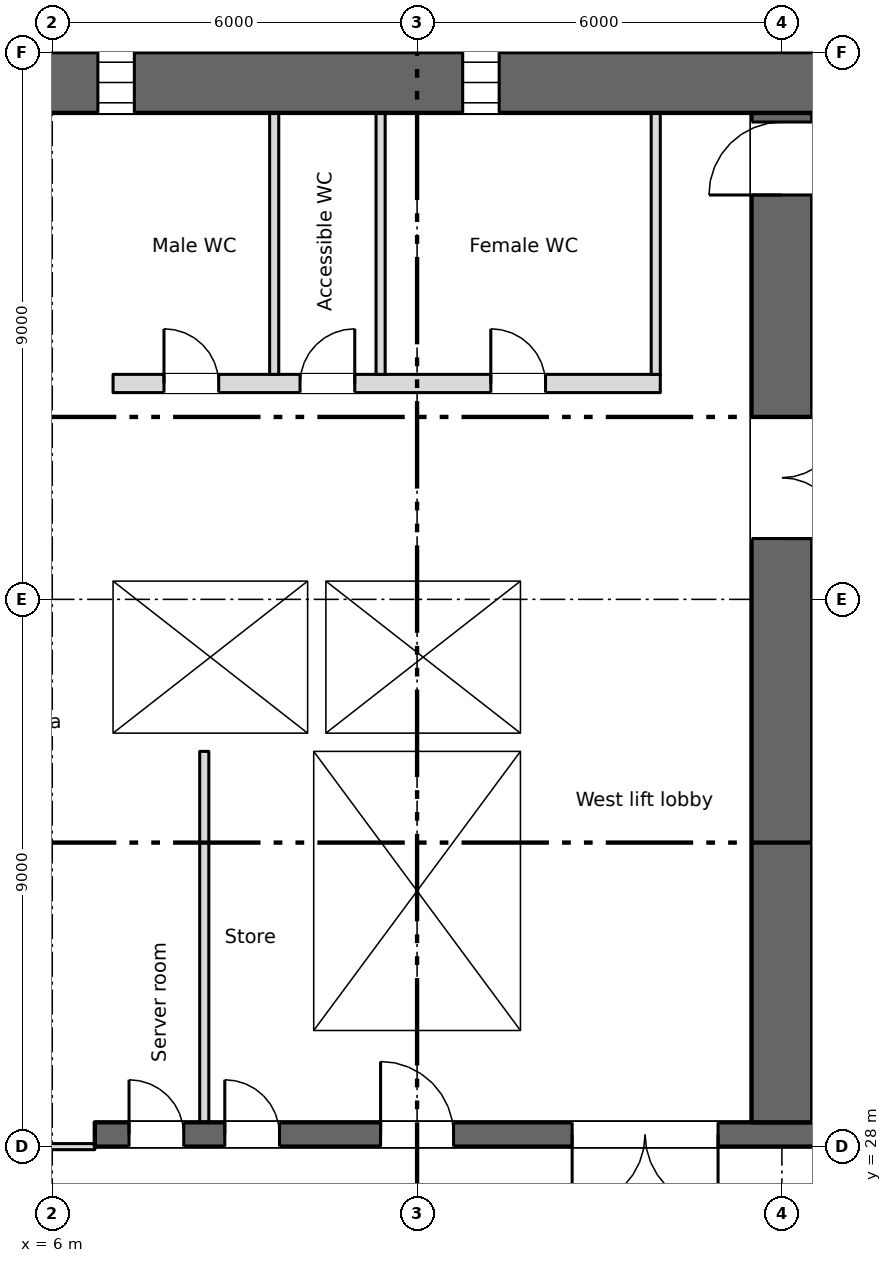
"""IFC4 building model, lengths in metres.
Left out: names, types, materials, properties, quantities, classifications, styles, units other than length and angle.
Written with IfcOpenShell. Run it as: python <this file> out.ifc"""

import sys

from ifc_helpers import new_model, si_unit, direction, frame, frame_2d, origin, place, context, subcontext, project, spatial, rectangle, extrude, element, fill, save


model = new_model("IFC4")
c1 = context("Model", 3, precision=1e-05, world=origin(), true_north=direction((0.0, 1.0)))
c2 = subcontext(c1, "Body", "Model", "MODEL_VIEW")
j1 = project(units=[si_unit("LENGTHUNIT", "METRE"), si_unit("PLANEANGLEUNIT", "RADIAN")], contexts=[c1])
p1 = place(None, origin())
s1 = spatial("IfcSite", under=j1, at=p1, CompositionType="ELEMENT")
p2 = place(p1, origin())
s2 = spatial("IfcBuilding", under=s1, at=p2, CompositionType="ELEMENT")
p3 = place(p2, frame((0.0, 0.0, 41.25)))
s3 = spatial("IfcBuildingStorey", under=s2, at=p3, CompositionType="ELEMENT", Elevation=41.25)
p4 = place(p3, frame((5.55, 45.5, 0.0), z_axis=(0.0, 0.0, 1.0), x_axis=(1.0, 0.0, 0.0)))
e1 = element("IfcWall", 1, at=p4, inside=s3, PredefinedType="SHEAR", context=c2, shape_type="SweptSolid", body=[
    extrude(rectangle(XDim=66.9, YDim=1.0, at=frame_2d((33.45, 0.0))), origin(), (0.0, 0.0, 1.0), 3.35),
])
p5 = place(p4, frame((1.2, 0.0, 0.6)))
e2 = element("IfcOpeningElement", 2, at=p5, cuts=e1, PredefinedType="OPENING", context=c2, shape_type="SweptSolid", body=[
    extrude(rectangle(XDim=0.6, YDim=2.4, at=frame_2d((0.3, 1.2))), frame((0.0, 0.51, 0.0), z_axis=(0.0, -1.0, 0.0), x_axis=(1.0, 0.0, 0.0)), (0.0, 0.0, 1.0), 1.02),
])
p6 = place(p4, frame((7.2, 0.0, 0.6)))
e3 = element("IfcOpeningElement", 3, at=p6, cuts=e1, PredefinedType="OPENING", context=c2, shape_type="SweptSolid", body=[
    extrude(rectangle(XDim=0.6, YDim=2.4, at=frame_2d((0.3, 1.2))), frame((0.0, 0.51, 0.0), z_axis=(0.0, -1.0, 0.0), x_axis=(1.0, 0.0, 0.0)), (0.0, 0.0, 1.0), 1.02),
])
p7 = place(p4, frame((55.2, 0.0, 0.6)))
e4 = element("IfcOpeningElement", 4, at=p7, cuts=e1, PredefinedType="OPENING", context=c2, shape_type="SweptSolid", body=[
    extrude(rectangle(XDim=0.6, YDim=2.4, at=frame_2d((0.3, 1.2))), frame((0.0, 0.51, 0.0), z_axis=(0.0, -1.0, 0.0), x_axis=(1.0, 0.0, 0.0)), (0.0, 0.0, 1.0), 1.02),
])
p8 = place(p4, frame((61.2, 0.0, 0.6)))
e5 = element("IfcOpeningElement", 5, at=p8, cuts=e1, PredefinedType="OPENING", context=c2, shape_type="SweptSolid", body=[
    extrude(rectangle(XDim=0.6, YDim=2.4, at=frame_2d((0.3, 1.2))), frame((0.0, 0.51, 0.0), z_axis=(0.0, -1.0, 0.0), x_axis=(1.0, 0.0, 0.0)), (0.0, 0.0, 1.0), 1.02),
])
p9 = place(p3, frame((6.7, 28.2, 0.0), z_axis=(0.0, 0.0, 1.0), x_axis=(1.0, 0.0, 0.0)))
e6 = element("IfcWall", 6, at=p9, inside=s3, PredefinedType="SHEAR", context=c2, shape_type="SweptSolid", body=[
    extrude(rectangle(XDim=57.8, YDim=0.4, at=frame_2d((28.9, 0.0))), origin(), (0.0, 0.0, 1.0), 3.35),
])
p10 = place(p9, frame((12.812, 0.0, 0.0)))
e7 = element("IfcOpeningElement", 7, at=p10, cuts=e6, PredefinedType="OPENING", context=c2, shape_type="SweptSolid", body=[
    extrude(rectangle(XDim=0.9, YDim=2.1, at=frame_2d((0.45, 1.05))), frame((0.0, 0.21, 0.0), z_axis=(0.0, -1.0, 0.0), x_axis=(1.0, 0.0, 0.0)), (0.0, 0.0, 1.0), 0.42),
])
p11 = place(p9, frame((15.387, 0.0, 0.0)))
e8 = element("IfcOpeningElement", 8, at=p11, cuts=e6, PredefinedType="OPENING", context=c2, shape_type="SweptSolid", body=[
    extrude(rectangle(XDim=0.9, YDim=2.1, at=frame_2d((0.45, 1.05))), frame((0.0, 0.21, 0.0), z_axis=(0.0, -1.0, 0.0), x_axis=(1.0, 0.0, 0.0)), (0.0, 0.0, 1.0), 0.42),
])
p12 = place(p9, frame((48.312, 0.0, 0.0)))
e9 = element("IfcOpeningElement", 9, at=p12, cuts=e6, PredefinedType="OPENING", context=c2, shape_type="SweptSolid", body=[
    extrude(rectangle(XDim=0.9, YDim=2.1, at=frame_2d((0.45, 1.05))), frame((0.0, 0.21, 0.0), z_axis=(0.0, -1.0, 0.0), x_axis=(1.0, 0.0, 0.0)), (0.0, 0.0, 1.0), 0.42),
])
p13 = place(p9, frame((50.887, 0.0, 0.0)))
e10 = element("IfcOpeningElement", 10, at=p13, cuts=e6, PredefinedType="OPENING", context=c2, shape_type="SweptSolid", body=[
    extrude(rectangle(XDim=0.9, YDim=2.1, at=frame_2d((0.45, 1.05))), frame((0.0, 0.21, 0.0), z_axis=(0.0, -1.0, 0.0), x_axis=(1.0, 0.0, 0.0)), (0.0, 0.0, 1.0), 0.42),
])
p14 = place(p9, frame((0.562, 0.0, 0.0)))
e11 = element("IfcOpeningElement", 11, at=p14, cuts=e6, PredefinedType="OPENING", context=c2, shape_type="SweptSolid", body=[
    extrude(rectangle(XDim=0.9, YDim=2.1, at=frame_2d((0.45, 1.05))), frame((0.0, 0.21, 0.0), z_axis=(0.0, -1.0, 0.0), x_axis=(1.0, 0.0, 0.0)), (0.0, 0.0, 1.0), 0.42),
])
p15 = place(p9, frame((2.137, 0.0, 0.0)))
e12 = element("IfcOpeningElement", 12, at=p15, cuts=e6, PredefinedType="OPENING", context=c2, shape_type="SweptSolid", body=[
    extrude(rectangle(XDim=0.9, YDim=2.1, at=frame_2d((0.45, 1.05))), frame((0.0, 0.21, 0.0), z_axis=(0.0, -1.0, 0.0), x_axis=(1.0, 0.0, 0.0)), (0.0, 0.0, 1.0), 0.42),
])
p16 = place(p9, frame((4.7, 0.0, 0.0)))
e13 = element("IfcOpeningElement", 13, at=p16, cuts=e6, PredefinedType="OPENING", context=c2, shape_type="SweptSolid", body=[
    extrude(rectangle(XDim=1.2, YDim=2.1, at=frame_2d((0.6, 1.05))), frame((0.0, 0.21, 0.0), z_axis=(0.0, -1.0, 0.0), x_axis=(1.0, 0.0, 0.0)), (0.0, 0.0, 1.0), 0.42),
])
p17 = place(p9, frame((31.7, 0.0, 0.0)))
e14 = element("IfcOpeningElement", 14, at=p17, cuts=e6, PredefinedType="OPENING", context=c2, shape_type="SweptSolid", body=[
    extrude(rectangle(XDim=1.2, YDim=2.1, at=frame_2d((0.6, 1.05))), frame((0.0, 0.21, 0.0), z_axis=(0.0, -1.0, 0.0), x_axis=(1.0, 0.0, 0.0)), (0.0, 0.0, 1.0), 0.42),
])
p18 = place(p9, frame((55.2, 0.0, 0.0)))
e15 = element("IfcOpeningElement", 15, at=p18, cuts=e6, PredefinedType="OPENING", context=c2, shape_type="SweptSolid", body=[
    extrude(rectangle(XDim=1.2, YDim=2.1, at=frame_2d((0.6, 1.05))), frame((0.0, 0.21, 0.0), z_axis=(0.0, -1.0, 0.0), x_axis=(1.0, 0.0, 0.0)), (0.0, 0.0, 1.0), 0.42),
])
p19 = place(p9, frame((21.7, 0.0, 0.0)))
e16 = element("IfcOpeningElement", 16, at=p19, cuts=e6, PredefinedType="OPENING", context=c2, shape_type="SweptSolid", body=[
    extrude(rectangle(XDim=1.2, YDim=2.1, at=frame_2d((0.6, 1.05))), frame((0.0, 0.21, 0.0), z_axis=(0.0, -1.0, 0.0), x_axis=(1.0, 0.0, 0.0)), (0.0, 0.0, 1.0), 0.42),
])
p20 = place(p9, frame((41.7, 0.0, 0.0)))
e17 = element("IfcOpeningElement", 17, at=p20, cuts=e6, PredefinedType="OPENING", context=c2, shape_type="SweptSolid", body=[
    extrude(rectangle(XDim=1.2, YDim=2.1, at=frame_2d((0.6, 1.05))), frame((0.0, 0.21, 0.0), z_axis=(0.0, -1.0, 0.0), x_axis=(1.0, 0.0, 0.0)), (0.0, 0.0, 1.0), 0.42),
])
p21 = place(p9, frame((24.85, 0.0, 0.0)))
e18 = element("IfcOpeningElement", 18, at=p21, cuts=e6, PredefinedType="OPENING", context=c2, shape_type="SweptSolid", body=[
    extrude(rectangle(XDim=2.4, YDim=2.1, at=frame_2d((1.2, 1.05))), frame((0.0, 0.21, 0.0), z_axis=(0.0, -1.0, 0.0), x_axis=(1.0, 0.0, 0.0)), (0.0, 0.0, 1.0), 0.42),
])
p22 = place(p9, frame((37.35, 0.0, 0.0)))
e19 = element("IfcOpeningElement", 19, at=p22, cuts=e6, PredefinedType="OPENING", context=c2, shape_type="SweptSolid", body=[
    extrude(rectangle(XDim=2.4, YDim=2.1, at=frame_2d((1.2, 1.05))), frame((0.0, 0.21, 0.0), z_axis=(0.0, -1.0, 0.0), x_axis=(1.0, 0.0, 0.0)), (0.0, 0.0, 1.0), 0.42),
])
p23 = place(p9, frame((7.85, 0.0, 0.0)))
e20 = element("IfcOpeningElement", 20, at=p23, cuts=e6, PredefinedType="OPENING", context=c2, shape_type="SweptSolid", body=[
    extrude(rectangle(XDim=2.4, YDim=2.1, at=frame_2d((1.2, 1.05))), frame((0.0, 0.21, 0.0), z_axis=(0.0, -1.0, 0.0), x_axis=(1.0, 0.0, 0.0)), (0.0, 0.0, 1.0), 0.42),
])
p24 = place(p9, frame((28.85, 0.0, 0.0)))
e21 = element("IfcOpeningElement", 21, at=p24, cuts=e6, PredefinedType="OPENING", context=c2, shape_type="SweptSolid", body=[
    extrude(rectangle(XDim=0.9, YDim=2.1, at=frame_2d((0.45, 1.05))), frame((0.0, 0.21, 0.0), z_axis=(0.0, -1.0, 0.0), x_axis=(1.0, 0.0, 0.0)), (0.0, 0.0, 1.0), 0.42),
])
p25 = place(p9, frame((34.85, 0.0, 0.0)))
e22 = element("IfcOpeningElement", 22, at=p25, cuts=e6, PredefinedType="OPENING", context=c2, shape_type="SweptSolid", body=[
    extrude(rectangle(XDim=0.9, YDim=2.1, at=frame_2d((0.45, 1.05))), frame((0.0, 0.21, 0.0), z_axis=(0.0, -1.0, 0.0), x_axis=(1.0, 0.0, 0.0)), (0.0, 0.0, 1.0), 0.42),
])
p26 = place(p3, frame((6.85, 28.4, 0.0), z_axis=(0.0, 0.0, 1.0), x_axis=(0.0, 1.0, 0.0)))
e23 = element("IfcWall", 23, at=p26, inside=s3, PredefinedType="SHEAR", context=c2, shape_type="SweptSolid", body=[
    extrude(rectangle(XDim=16.6, YDim=0.3, at=frame_2d((8.3, 0.0))), origin(), (0.0, 0.0, 1.0), 3.35),
])
p27 = place(p3, frame((18.0, 28.4, 0.0), z_axis=(0.0, 0.0, 1.0), x_axis=(0.0, 1.0, 0.0)))
e24 = element("IfcWall", 24, at=p27, inside=s3, PredefinedType="SHEAR", context=c2, shape_type="SweptSolid", body=[
    extrude(rectangle(XDim=16.6, YDim=1.0, at=frame_2d((8.3, 0.0))), origin(), (0.0, 0.0, 1.0), 3.35),
])
p28 = place(p27, frame((9.6, 0.0, 0.0)))
e25 = element("IfcOpeningElement", 25, at=p28, cuts=e24, PredefinedType="OPENING", context=c2, shape_type="SweptSolid", body=[
    extrude(rectangle(XDim=2.0, YDim=2.1, at=frame_2d((1.0, 1.05))), frame((0.0, 0.51, 0.0), z_axis=(0.0, -1.0, 0.0), x_axis=(1.0, 0.0, 0.0)), (0.0, 0.0, 1.0), 1.02),
])
p29 = place(p27, frame((15.25, 0.0, 0.0)))
e26 = element("IfcOpeningElement", 26, at=p29, cuts=e24, PredefinedType="OPENING", context=c2, shape_type="SweptSolid", body=[
    extrude(rectangle(XDim=1.2, YDim=2.1, at=frame_2d((0.6, 1.05))), frame((0.0, 0.51, 0.0), z_axis=(0.0, -1.0, 0.0), x_axis=(1.0, 0.0, 0.0)), (0.0, 0.0, 1.0), 1.02),
])
for number, where, z_axis, x_axis in (
    (27, (10.15, 28.4, 0.0), (0.0, 0.0, 1.0), (0.0, 1.0, 0.0)),
    (28, (13.85, 28.4, 0.0), (0.0, 0.0, 1.0), (0.0, 1.0, 0.0)),
):
    element("IfcWall", number, at=place(p3, frame(where, z_axis=z_axis, x_axis=x_axis)), inside=s3, PredefinedType="SHEAR", context=c2, shape_type="SweptSolid", body=[
        extrude(rectangle(XDim=6.1, YDim=0.3, at=frame_2d((3.05, 0.0))), origin(), (0.0, 0.0, 1.0), 3.35),
    ])
for number, where, z_axis, x_axis in (
    (29, (7.0, 34.65, 0.0), (0.0, 0.0, 1.0), (1.0, 0.0, 0.0)),
    (30, (7.0, 37.45, 0.0), (0.0, 0.0, 1.0), (1.0, 0.0, 0.0)),
):
    element("IfcWall", number, at=place(p3, frame(where, z_axis=z_axis, x_axis=x_axis)), inside=s3, PredefinedType="SHEAR", context=c2, shape_type="SweptSolid", body=[
        extrude(rectangle(XDim=7.0, YDim=0.3, at=frame_2d((3.5, 0.0))), origin(), (0.0, 0.0, 1.0), 3.35),
    ])
p30 = place(p3, frame((13.85, 34.8, 0.0), z_axis=(0.0, 0.0, 1.0), x_axis=(0.0, 1.0, 0.0)))
e31 = element("IfcWall", 31, at=p30, inside=s3, PredefinedType="SHEAR", context=c2, shape_type="SweptSolid", body=[
    extrude(rectangle(XDim=2.5, YDim=0.3, at=frame_2d((1.25, 0.0))), origin(), (0.0, 0.0, 1.0), 3.35),
])
p31 = place(p3, frame((7.0, 40.55, 0.0), z_axis=(0.0, 0.0, 1.0), x_axis=(1.0, 0.0, 0.0)))
e32 = element("IfcWall", 32, at=p31, inside=s3, PredefinedType="PARTITIONING", context=c2, shape_type="SweptSolid", body=[
    extrude(rectangle(XDim=9.0, YDim=0.3, at=frame_2d((4.5, 0.0))), origin(), (0.0, 0.0, 1.0), 3.35),
])
p32 = place(p31, frame((0.837, 0.0, 0.0)))
e33 = element("IfcOpeningElement", 33, at=p32, cuts=e32, PredefinedType="OPENING", context=c2, shape_type="SweptSolid", body=[
    extrude(rectangle(XDim=0.9, YDim=2.1, at=frame_2d((0.45, 1.05))), frame((0.0, 0.16, 0.0), z_axis=(0.0, -1.0, 0.0), x_axis=(1.0, 0.0, 0.0)), (0.0, 0.0, 1.0), 0.32),
])
p33 = place(p31, frame((3.075, 0.0, 0.0)))
e34 = element("IfcOpeningElement", 34, at=p33, cuts=e32, PredefinedType="OPENING", context=c2, shape_type="SweptSolid", body=[
    extrude(rectangle(XDim=0.9, YDim=2.1, at=frame_2d((0.45, 1.05))), frame((0.0, 0.16, 0.0), z_axis=(0.0, -1.0, 0.0), x_axis=(1.0, 0.0, 0.0)), (0.0, 0.0, 1.0), 0.32),
])
p34 = place(p31, frame((6.212, 0.0, 0.0)))
e35 = element("IfcOpeningElement", 35, at=p34, cuts=e32, PredefinedType="OPENING", context=c2, shape_type="SweptSolid", body=[
    extrude(rectangle(XDim=0.9, YDim=2.1, at=frame_2d((0.45, 1.05))), frame((0.0, 0.16, 0.0), z_axis=(0.0, -1.0, 0.0), x_axis=(1.0, 0.0, 0.0)), (0.0, 0.0, 1.0), 0.32),
])
p35 = place(p3, frame((10.35, 34.8, 0.0), z_axis=(0.0, 0.0, 1.0), x_axis=(0.0, 1.0, 0.0)))
e36 = element("IfcWall", 36, at=p35, inside=s3, PredefinedType="SHEAR", context=c2, shape_type="SweptSolid", body=[
    extrude(rectangle(XDim=2.5, YDim=0.3, at=frame_2d((1.25, 0.0))), origin(), (0.0, 0.0, 1.0), 3.35),
])
p36 = place(p3, frame((15.925, 40.7, 0.0), z_axis=(0.0, 0.0, 1.0), x_axis=(0.0, 1.0, 0.0)))
e37 = element("IfcWall", 37, at=p36, inside=s3, PredefinedType="PARTITIONING", context=c2, shape_type="SweptSolid", body=[
    extrude(rectangle(XDim=4.3, YDim=0.15, at=frame_2d((2.15, 0.0))), origin(), (0.0, 0.0, 1.0), 3.35),
])
p37 = place(p3, frame((8.5, 28.4, 0.0), z_axis=(0.0, 0.0, 1.0), x_axis=(0.0, 1.0, 0.0)))
e38 = element("IfcWall", 38, at=p37, inside=s3, PredefinedType="PARTITIONING", context=c2, shape_type="SweptSolid", body=[
    extrude(rectangle(XDim=6.1, YDim=0.15, at=frame_2d((3.05, 0.0))), origin(), (0.0, 0.0, 1.0), 3.35),
])
for number, where, z_axis, x_axis in (
    (39, (9.65, 40.7, 0.0), (0.0, 0.0, 1.0), (0.0, 1.0, 0.0)),
    (40, (11.4, 40.7, 0.0), (0.0, 0.0, 1.0), (0.0, 1.0, 0.0)),
):
    element("IfcWall", number, at=place(p3, frame(where, z_axis=z_axis, x_axis=x_axis)), inside=s3, PredefinedType="PARTITIONING", context=c2, shape_type="SweptSolid", body=[
        extrude(rectangle(XDim=4.3, YDim=0.15, at=frame_2d((2.15, 0.0))), origin(), (0.0, 0.0, 1.0), 3.35),
    ])
p38 = place(p3, frame((0.8, 28.0, 0.0), z_axis=(0.0, 0.0, 1.0), x_axis=(1.0, 0.0, 0.0)))
e41 = element("IfcWall", 41, at=p38, inside=s3, PredefinedType="PARTITIONING", context=c2, shape_type="SweptSolid", body=[
    extrude(rectangle(XDim=5.9, YDim=0.1, at=frame_2d((2.95, 0.0))), origin(), (0.0, 0.0, 1.0), 3.35),
])
p39 = place(p38, frame((2.05, 0.0, 0.0)))
e42 = element("IfcOpeningElement", 42, at=p39, cuts=e41, PredefinedType="OPENING", context=c2, shape_type="SweptSolid", body=[
    extrude(rectangle(XDim=1.8, YDim=2.1, at=frame_2d((0.9, 1.05))), frame((0.0, 0.06, 0.0), z_axis=(0.0, -1.0, 0.0), x_axis=(1.0, 0.0, 0.0)), (0.0, 0.0, 1.0), 0.12),
])
p40 = place(p5, origin())
e43 = element("IfcWindow", 43, at=p40, inside=s3, PartitioningType="SINGLE_PANEL", PredefinedType="WINDOW", context=c2, shape_type="SweptSolid", body=[
    extrude(rectangle(XDim=0.6, YDim=2.4, at=frame_2d((0.3, 1.2))), frame((0.0, 0.03, 0.0), z_axis=(0.0, -1.0, 0.0), x_axis=(1.0, 0.0, 0.0)), (0.0, 0.0, 1.0), 0.06),
])
fill(e2, e43)
p41 = place(p6, origin())
e44 = element("IfcWindow", 44, at=p41, inside=s3, PartitioningType="SINGLE_PANEL", PredefinedType="WINDOW", context=c2, shape_type="SweptSolid", body=[
    extrude(rectangle(XDim=0.6, YDim=2.4, at=frame_2d((0.3, 1.2))), frame((0.0, 0.03, 0.0), z_axis=(0.0, -1.0, 0.0), x_axis=(1.0, 0.0, 0.0)), (0.0, 0.0, 1.0), 0.06),
])
fill(e3, e44)
p42 = place(p14, origin())
e45 = element("IfcDoor", 45, at=p42, inside=s3, OperationType="SINGLE_SWING_LEFT", PredefinedType="DOOR", context=c2, shape_type="SweptSolid", body=[
    extrude(rectangle(XDim=0.9, YDim=2.1, at=frame_2d((0.45, 1.05))), frame((0.0, 0.025, 0.0), z_axis=(0.0, -1.0, 0.0), x_axis=(1.0, 0.0, 0.0)), (0.0, 0.0, 1.0), 0.05),
])
fill(e11, e45)
p43 = place(p15, origin())
e46 = element("IfcDoor", 46, at=p43, inside=s3, OperationType="SINGLE_SWING_LEFT", PredefinedType="DOOR", context=c2, shape_type="SweptSolid", body=[
    extrude(rectangle(XDim=0.9, YDim=2.1, at=frame_2d((0.45, 1.05))), frame((0.0, 0.025, 0.0), z_axis=(0.0, -1.0, 0.0), x_axis=(1.0, 0.0, 0.0)), (0.0, 0.0, 1.0), 0.05),
])
fill(e12, e46)
p44 = place(p32, origin())
e47 = element("IfcDoor", 47, at=p44, inside=s3, OperationType="SINGLE_SWING_LEFT", PredefinedType="DOOR", context=c2, shape_type="SweptSolid", body=[
    extrude(rectangle(XDim=0.9, YDim=2.1, at=frame_2d((0.45, 1.05))), frame((0.0, 0.025, 0.0), z_axis=(0.0, -1.0, 0.0), x_axis=(1.0, 0.0, 0.0)), (0.0, 0.0, 1.0), 0.05),
])
fill(e33, e47)
p45 = place(p33, origin())
e48 = element("IfcDoor", 48, at=p45, inside=s3, OperationType="SINGLE_SWING_RIGHT", PredefinedType="DOOR", context=c2, shape_type="SweptSolid", body=[
    extrude(rectangle(XDim=0.9, YDim=2.1, at=frame_2d((0.45, 1.05))), frame((0.0, 0.025, 0.0), z_axis=(0.0, -1.0, 0.0), x_axis=(1.0, 0.0, 0.0)), (0.0, 0.0, 1.0), 0.05),
])
fill(e34, e48)
p46 = place(p34, origin())
e49 = element("IfcDoor", 49, at=p46, inside=s3, OperationType="SINGLE_SWING_LEFT", PredefinedType="DOOR", context=c2, shape_type="SweptSolid", body=[
    extrude(rectangle(XDim=0.9, YDim=2.1, at=frame_2d((0.45, 1.05))), frame((0.0, 0.025, 0.0), z_axis=(0.0, -1.0, 0.0), x_axis=(1.0, 0.0, 0.0)), (0.0, 0.0, 1.0), 0.05),
])
fill(e35, e49)
p47 = place(p16, origin())
e50 = element("IfcDoor", 50, at=p47, inside=s3, OperationType="SINGLE_SWING_LEFT", PredefinedType="DOOR", context=c2, shape_type="SweptSolid", body=[
    extrude(rectangle(XDim=1.2, YDim=2.1, at=frame_2d((0.6, 1.05))), frame((0.0, 0.025, 0.0), z_axis=(0.0, -1.0, 0.0), x_axis=(1.0, 0.0, 0.0)), (0.0, 0.0, 1.0), 0.05),
])
fill(e13, e50)
p48 = place(p23, origin())
e51 = element("IfcDoor", 51, at=p48, inside=s3, OperationType="DOUBLE_DOOR_SINGLE_SWING", PredefinedType="DOOR", context=c2, shape_type="SweptSolid", body=[
    extrude(rectangle(XDim=2.4, YDim=2.1, at=frame_2d((1.2, 1.05))), frame((0.0, 0.025, 0.0), z_axis=(0.0, -1.0, 0.0), x_axis=(1.0, 0.0, 0.0)), (0.0, 0.0, 1.0), 0.05),
])
fill(e20, e51)
p49 = place(p28, origin())
e52 = element("IfcDoor", 52, at=p49, inside=s3, OperationType="DOUBLE_DOOR_SINGLE_SWING", PredefinedType="DOOR", context=c2, shape_type="SweptSolid", body=[
    extrude(rectangle(XDim=2.0, YDim=2.1, at=frame_2d((1.0, 1.05))), frame((0.0, 0.025, 0.0), z_axis=(0.0, -1.0, 0.0), x_axis=(1.0, 0.0, 0.0)), (0.0, 0.0, 1.0), 0.05),
])
fill(e25, e52)
p50 = place(p29, origin())
e53 = element("IfcDoor", 53, at=p50, inside=s3, OperationType="SINGLE_SWING_LEFT", PredefinedType="DOOR", context=c2, shape_type="SweptSolid", body=[
    extrude(rectangle(XDim=1.2, YDim=2.1, at=frame_2d((0.6, 1.05))), frame((0.0, 0.025, 0.0), z_axis=(0.0, -1.0, 0.0), x_axis=(1.0, 0.0, 0.0)), (0.0, 0.0, 1.0), 0.05),
])
fill(e26, e53)
save(model, sys.argv[1])
